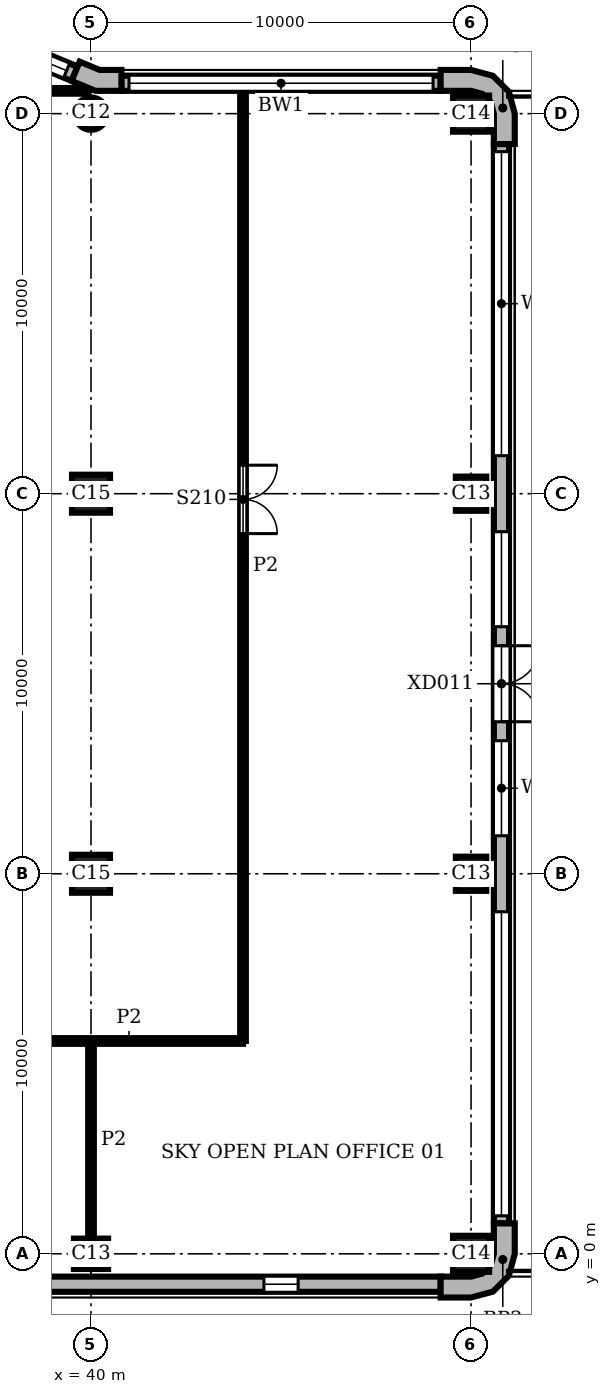
"""IFC4 building model, lengths in metres.
Left out: names, types, materials, properties, quantities, classifications, styles, units other than length and angle.
Written with IfcOpenShell. Run it as: python <this file> out.ifc"""

import sys

from ifc_helpers import new_model, si_unit, direction, frame, frame_2d, origin, origin_2d, place, context, subcontext, project, spatial, polyline, rectangle, circle, outline, extrude, element, fill, save


model = new_model("IFC4")
c1 = context("Model", 3, precision=1e-05, world=origin(), true_north=direction((0.0, 1.0)))
c2 = subcontext(c1, "Body", "Model", "MODEL_VIEW")
j1 = project(units=[si_unit("LENGTHUNIT", "METRE"), si_unit("PLANEANGLEUNIT", "RADIAN")], contexts=[c1])
p1 = place(None, origin())
s1 = spatial("IfcSite", under=j1, at=p1, CompositionType="ELEMENT")
p2 = place(p1, origin())
s2 = spatial("IfcBuilding", under=s1, at=p2, CompositionType="ELEMENT")
p3 = place(p2, frame((0.0, 0.0, 246.0)))
s3 = spatial("IfcBuildingStorey", under=s2, at=p3, CompositionType="ELEMENT", Elevation=246.0)
p4 = place(p3, frame((40.0, 0.0, 0.0), z_axis=(0.0, 0.0, 1.0), x_axis=(1.0, 0.0, 0.0)))
e1 = element("IfcColumn", 1, at=p4, inside=s3, PredefinedType="COLUMN", context=c2, shape_type="SweptSolid", body=[
    extrude(rectangle(XDim=0.9, YDim=0.8, at=origin_2d()), origin(), (0.0, 0.0, 1.0), 5.4),
])
p5 = place(p3, frame((50.0, 0.0, 0.0), z_axis=(0.0, 0.0, 1.0), x_axis=(1.0, 0.0, 0.0)))
e2 = element("IfcColumn", 2, at=p5, inside=s3, PredefinedType="COLUMN", context=c2, shape_type="SweptSolid", body=[
    extrude(rectangle(XDim=0.95, YDim=0.95, at=origin_2d()), origin(), (0.0, 0.0, 1.0), 5.4),
])
for number, where, z_axis, x_axis in (
    (3, (50.0, 10.0, 0.0), (0.0, 0.0, 1.0), (0.0, 1.0, 0.0)),
    (4, (50.0, 20.0, 0.0), (0.0, 0.0, 1.0), (0.0, 1.0, 0.0)),
):
    element("IfcColumn", number, at=place(p3, frame(where, z_axis=z_axis, x_axis=x_axis)), inside=s3, PredefinedType="COLUMN", context=c2, shape_type="SweptSolid", body=[
        extrude(rectangle(XDim=0.9, YDim=0.8, at=origin_2d()), origin(), (0.0, 0.0, 1.0), 5.4),
    ])
p6 = place(p3, frame((50.0, 30.0, 0.0), z_axis=(0.0, 0.0, 1.0), x_axis=(1.0, 0.0, 0.0)))
e5 = element("IfcColumn", 5, at=p6, inside=s3, PredefinedType="COLUMN", context=c2, shape_type="SweptSolid", body=[
    extrude(rectangle(XDim=0.95, YDim=0.95, at=origin_2d()), origin(), (0.0, 0.0, 1.0), 5.4),
])
p7 = place(p3, frame((40.0, 30.0, 0.0), z_axis=(0.0, 0.0, 1.0), x_axis=(1.0, 0.0, 0.0)))
e6 = element("IfcColumn", 6, at=p7, inside=s3, PredefinedType="COLUMN", context=c2, shape_type="SweptSolid", body=[
    extrude(circle(Radius=0.425, at=origin_2d()), origin(), (0.0, 0.0, 1.0), 5.4),
])
for number, where, z_axis, x_axis in (
    (7, (40.0, 10.0, 0.0), (0.0, 0.0, 1.0), (1.0, 0.0, 0.0)),
    (8, (40.0, 20.0, 0.0), (0.0, 0.0, 1.0), (1.0, 0.0, 0.0)),
):
    element("IfcColumn", number, at=place(p3, frame(where, z_axis=z_axis, x_axis=x_axis)), inside=s3, PredefinedType="COLUMN", context=c2, shape_type="SweptSolid", body=[
        extrude(rectangle(XDim=1.0, YDim=1.0, at=origin_2d()), origin(), (0.0, 0.0, 1.0), 5.4),
    ])
p8 = place(p3, origin())
e9 = element("IfcWall", 9, at=p8, inside=s3, PredefinedType="SOLIDWALL", context=c2, shape_type="SweptSolid", body=[
    extrude(outline(polyline([(49.2, -1.0), (49.2, -1.15), (50.0, -1.15), (50.575, -0.996), (50.996, -0.575), (51.15, 0.0), (51.15, 0.8), (51.0, 0.8), (50.6, 0.8), (50.6, 0.0), (50.52, -0.3), (50.3, -0.52), (50.0, -0.6), (49.2, -0.6), (49.2, -1.0)])), origin(), (0.0, 0.0, 1.0), 5.4),
])
e10 = element("IfcWall", 10, at=p8, inside=s3, PredefinedType="SOLIDWALL", context=c2, shape_type="SweptSolid", body=[
    extrude(outline(polyline([(51.0, 29.2), (51.15, 29.2), (51.15, 30.0), (50.996, 30.575), (50.575, 30.996), (50.0, 31.15), (49.2, 31.15), (49.2, 31.0), (49.2, 30.6), (50.0, 30.6), (50.3, 30.52), (50.52, 30.3), (50.6, 30.0), (50.6, 29.2), (51.0, 29.2)])), origin(), (0.0, 0.0, 1.0), 5.4),
])
e11 = element("IfcWall", 11, at=p8, inside=s3, PredefinedType="SOLIDWALL", context=c2, shape_type="SweptSolid", body=[
    extrude(outline(polyline([(40.8, 31.0), (40.8, 31.15), (40.229, 31.15), (39.701, 31.369), (39.644, 31.23), (39.49, 30.861), (40.119, 30.6), (40.8, 30.6), (40.8, 31.0)])), origin(), (0.0, 0.0, 1.0), 5.4),
])
p9 = place(p3, frame((20.8, -0.8, 0.0), z_axis=(0.0, 0.0, 1.0), x_axis=(1.0, 0.0, 0.0)))
e12 = element("IfcWall", 12, at=p9, inside=s3, PredefinedType="SOLIDWALL", context=c2, shape_type="SweptSolid", body=[
    extrude(rectangle(XDim=28.4, YDim=0.4, at=frame_2d((14.2, 0.0))), origin(), (0.0, 0.0, 1.0), 5.4),
])
p10 = place(p9, frame((3.75, 0.0, 0.9)))
e13 = element("IfcOpeningElement", 13, at=p10, cuts=e12, PredefinedType="OPENING", context=c2, shape_type="SweptSolid", body=[
    extrude(rectangle(XDim=0.9, YDim=3.4, at=frame_2d((0.45, 1.7))), frame((0.0, 0.21, 0.0), z_axis=(0.0, -1.0, 0.0), x_axis=(1.0, 0.0, 0.0)), (0.0, 0.0, 1.0), 0.42),
])
p11 = place(p9, frame((13.75, 0.0, 0.9)))
e14 = element("IfcOpeningElement", 14, at=p11, cuts=e12, PredefinedType="OPENING", context=c2, shape_type="SweptSolid", body=[
    extrude(rectangle(XDim=0.9, YDim=3.4, at=frame_2d((0.45, 1.7))), frame((0.0, 0.21, 0.0), z_axis=(0.0, -1.0, 0.0), x_axis=(1.0, 0.0, 0.0)), (0.0, 0.0, 1.0), 0.42),
])
p12 = place(p9, frame((23.75, 0.0, 0.9)))
e15 = element("IfcOpeningElement", 15, at=p12, cuts=e12, PredefinedType="OPENING", context=c2, shape_type="SweptSolid", body=[
    extrude(rectangle(XDim=0.9, YDim=3.4, at=frame_2d((0.45, 1.7))), frame((0.0, 0.21, 0.0), z_axis=(0.0, -1.0, 0.0), x_axis=(1.0, 0.0, 0.0)), (0.0, 0.0, 1.0), 0.42),
])
p13 = place(p3, frame((50.8, 0.8, 0.0), z_axis=(0.0, 0.0, 1.0), x_axis=(0.0, 1.0, 0.0)))
e16 = element("IfcWall", 16, at=p13, inside=s3, PredefinedType="SOLIDWALL", context=c2, shape_type="SweptSolid", body=[
    extrude(rectangle(XDim=28.4, YDim=0.4, at=frame_2d((14.2, 0.0))), origin(), (0.0, 0.0, 1.0), 5.4),
])
p14 = place(p13, frame((0.2, 0.0, 0.9)))
e17 = element("IfcOpeningElement", 17, at=p14, cuts=e16, PredefinedType="OPENING", context=c2, shape_type="SweptSolid", body=[
    extrude(rectangle(XDim=8.0, YDim=3.4, at=frame_2d((4.0, 1.7))), frame((0.0, 0.21, 0.0), z_axis=(0.0, -1.0, 0.0), x_axis=(1.0, 0.0, 0.0)), (0.0, 0.0, 1.0), 0.42),
])
p15 = place(p13, frame((10.2, 0.0, 0.9)))
e18 = element("IfcOpeningElement", 18, at=p15, cuts=e16, PredefinedType="OPENING", context=c2, shape_type="SweptSolid", body=[
    extrude(rectangle(XDim=2.5, YDim=3.4, at=frame_2d((1.25, 1.7))), frame((0.0, 0.21, 0.0), z_axis=(0.0, -1.0, 0.0), x_axis=(1.0, 0.0, 0.0)), (0.0, 0.0, 1.0), 0.42),
])
p16 = place(p13, frame((13.2, 0.0, 0.0)))
e19 = element("IfcOpeningElement", 19, at=p16, cuts=e16, PredefinedType="OPENING", context=c2, shape_type="SweptSolid", body=[
    extrude(rectangle(XDim=2.0, YDim=2.4, at=frame_2d((1.0, 1.2))), frame((0.0, 0.21, 0.0), z_axis=(0.0, -1.0, 0.0), x_axis=(1.0, 0.0, 0.0)), (0.0, 0.0, 1.0), 0.42),
])
p17 = place(p13, frame((15.7, 0.0, 0.9)))
e20 = element("IfcOpeningElement", 20, at=p17, cuts=e16, PredefinedType="OPENING", context=c2, shape_type="SweptSolid", body=[
    extrude(rectangle(XDim=2.5, YDim=3.4, at=frame_2d((1.25, 1.7))), frame((0.0, 0.21, 0.0), z_axis=(0.0, -1.0, 0.0), x_axis=(1.0, 0.0, 0.0)), (0.0, 0.0, 1.0), 0.42),
])
p18 = place(p13, frame((20.2, 0.0, 0.9)))
e21 = element("IfcOpeningElement", 21, at=p18, cuts=e16, PredefinedType="OPENING", context=c2, shape_type="SweptSolid", body=[
    extrude(rectangle(XDim=8.0, YDim=3.4, at=frame_2d((4.0, 1.7))), frame((0.0, 0.21, 0.0), z_axis=(0.0, -1.0, 0.0), x_axis=(1.0, 0.0, 0.0)), (0.0, 0.0, 1.0), 0.42),
])
p19 = place(p3, frame((49.2, 30.8, 0.0), z_axis=(0.0, 0.0, 1.0), x_axis=(-1.0, 0.0, 0.0)))
e22 = element("IfcWall", 22, at=p19, inside=s3, PredefinedType="SOLIDWALL", context=c2, shape_type="SweptSolid", body=[
    extrude(rectangle(XDim=8.4, YDim=0.4, at=frame_2d((4.2, 0.0))), origin(), (0.0, 0.0, 1.0), 5.4),
])
p20 = place(p19, frame((0.2, 0.0, 0.9)))
e23 = element("IfcOpeningElement", 23, at=p20, cuts=e22, PredefinedType="OPENING", context=c2, shape_type="SweptSolid", body=[
    extrude(rectangle(XDim=8.0, YDim=3.4, at=frame_2d((4.0, 1.7))), frame((0.0, 0.21, 0.0), z_axis=(0.0, -1.0, 0.0), x_axis=(1.0, 0.0, 0.0)), (0.0, 0.0, 1.0), 0.42),
])
p21 = place(p3, frame((39.567, 31.045, 0.0), z_axis=(0.0, 0.0, 1.0), x_axis=(-0.923891000409, 0.382655745237, 0.0)))
e24 = element("IfcWall", 24, at=p21, inside=s3, PredefinedType="SOLIDWALL", context=c2, shape_type="SweptSolid", body=[
    extrude(rectangle(XDim=6.053, YDim=0.4, at=frame_2d((3.027, 0.0))), origin(), (0.0, 0.0, 1.0), 5.4),
])
p22 = place(p21, frame((0.227, 0.0, 0.9)))
e25 = element("IfcOpeningElement", 25, at=p22, cuts=e24, PredefinedType="OPENING", context=c2, shape_type="SweptSolid", body=[
    extrude(rectangle(XDim=5.6, YDim=3.4, at=frame_2d((2.8, 1.7))), frame((0.0, 0.21, 0.0), z_axis=(0.0, -1.0, 0.0), x_axis=(1.0, 0.0, 0.0)), (0.0, 0.0, 1.0), 0.42),
])
p23 = place(p3, frame((40.0, 0.4, 0.0), z_axis=(0.0, 0.0, 1.0), x_axis=(0.0, 1.0, 0.0)))
e26 = element("IfcWall", 26, at=p23, inside=s3, PredefinedType="PARTITIONING", context=c2, shape_type="SweptSolid", body=[
    extrude(rectangle(XDim=5.2, YDim=0.15, at=frame_2d((2.6, 0.0))), origin(), (0.0, 0.0, 1.0), 5.08),
])
p24 = place(p3, frame((44.0, 5.6, 0.0), z_axis=(0.0, 0.0, 1.0), x_axis=(0.0, 1.0, 0.0)))
e27 = element("IfcWall", 27, at=p24, inside=s3, PredefinedType="PARTITIONING", context=c2, shape_type="SweptSolid", body=[
    extrude(rectangle(XDim=25.0, YDim=0.15, at=frame_2d((12.5, 0.0))), origin(), (0.0, 0.0, 1.0), 5.08),
])
p25 = place(p24, frame((13.35, 0.0, 0.0)))
e28 = element("IfcOpeningElement", 28, at=p25, cuts=e27, PredefinedType="OPENING", context=c2, shape_type="SweptSolid", body=[
    extrude(rectangle(XDim=1.8, YDim=2.1, at=frame_2d((0.9, 1.05))), frame((0.0, 0.085, 0.0), z_axis=(0.0, -1.0, 0.0), x_axis=(1.0, 0.0, 0.0)), (0.0, 0.0, 1.0), 0.17),
])
p26 = place(p3, frame((38.0, 5.6, 0.0), z_axis=(0.0, 0.0, 1.0), x_axis=(1.0, 0.0, 0.0)))
e29 = element("IfcWall", 29, at=p26, inside=s3, PredefinedType="PARTITIONING", context=c2, shape_type="SweptSolid", body=[
    extrude(rectangle(XDim=6.0, YDim=0.15, at=frame_2d((3.0, 0.0))), origin(), (0.0, 0.0, 1.0), 5.08),
])
p27 = place(p3, frame((33.2, 30.6, 0.0), z_axis=(0.0, 0.0, 1.0), x_axis=(1.0, 0.0, 0.0)))
e30 = element("IfcWall", 30, at=p27, inside=s3, PredefinedType="PARTITIONING", context=c2, shape_type="SweptSolid", body=[
    extrude(rectangle(XDim=6.738, YDim=0.15, at=frame_2d((3.369, 0.0))), origin(), (0.0, 0.0, 1.0), 5.08),
])
p28 = place(p12, origin())
e31 = element("IfcWindow", 31, at=p28, inside=s3, PartitioningType="SINGLE_PANEL", PredefinedType="WINDOW", context=c2, shape_type="SweptSolid", body=[
    extrude(rectangle(XDim=0.9, YDim=3.4, at=frame_2d((0.45, 1.7))), frame((0.0, 0.16, 0.0), z_axis=(0.0, -1.0, 0.0), x_axis=(1.0, 0.0, 0.0)), (0.0, 0.0, 1.0), 0.06),
])
fill(e15, e31)
p29 = place(p14, origin())
e32 = element("IfcWindow", 32, at=p29, inside=s3, PartitioningType="SINGLE_PANEL", PredefinedType="WINDOW", context=c2, shape_type="SweptSolid", body=[
    extrude(rectangle(XDim=8.0, YDim=3.4, at=frame_2d((4.0, 1.7))), frame((0.0, 0.16, 0.0), z_axis=(0.0, -1.0, 0.0), x_axis=(1.0, 0.0, 0.0)), (0.0, 0.0, 1.0), 0.06),
])
fill(e17, e32)
p30 = place(p15, origin())
e33 = element("IfcWindow", 33, at=p30, inside=s3, PartitioningType="SINGLE_PANEL", PredefinedType="WINDOW", context=c2, shape_type="SweptSolid", body=[
    extrude(rectangle(XDim=2.5, YDim=3.4, at=frame_2d((1.25, 1.7))), frame((0.0, 0.16, 0.0), z_axis=(0.0, -1.0, 0.0), x_axis=(1.0, 0.0, 0.0)), (0.0, 0.0, 1.0), 0.06),
])
fill(e18, e33)
p31 = place(p16, frame((2.0, 0.0, 0.0), z_axis=(0.0, 0.0, 1.0), x_axis=(-1.0, 0.0, 0.0)))
e34 = element("IfcDoor", 34, at=p31, inside=s3, OperationType="DOUBLE_DOOR_DOUBLE_SWING", PredefinedType="DOOR", context=c2, shape_type="SweptSolid", body=[
    extrude(rectangle(XDim=2.0, YDim=2.4, at=frame_2d((1.0, 1.2))), frame((0.0, 0.025, 0.0), z_axis=(0.0, -1.0, 0.0), x_axis=(1.0, 0.0, 0.0)), (0.0, 0.0, 1.0), 0.05),
])
fill(e19, e34)
p32 = place(p17, origin())
e35 = element("IfcWindow", 35, at=p32, inside=s3, PartitioningType="SINGLE_PANEL", PredefinedType="WINDOW", context=c2, shape_type="SweptSolid", body=[
    extrude(rectangle(XDim=2.5, YDim=3.4, at=frame_2d((1.25, 1.7))), frame((0.0, 0.16, 0.0), z_axis=(0.0, -1.0, 0.0), x_axis=(1.0, 0.0, 0.0)), (0.0, 0.0, 1.0), 0.06),
])
fill(e20, e35)
p33 = place(p18, origin())
e36 = element("IfcWindow", 36, at=p33, inside=s3, PartitioningType="SINGLE_PANEL", PredefinedType="WINDOW", context=c2, shape_type="SweptSolid", body=[
    extrude(rectangle(XDim=8.0, YDim=3.4, at=frame_2d((4.0, 1.7))), frame((0.0, 0.16, 0.0), z_axis=(0.0, -1.0, 0.0), x_axis=(1.0, 0.0, 0.0)), (0.0, 0.0, 1.0), 0.06),
])
fill(e21, e36)
p34 = place(p20, origin())
e37 = element("IfcWindow", 37, at=p34, inside=s3, PartitioningType="SINGLE_PANEL", PredefinedType="WINDOW", context=c2, shape_type="SweptSolid", body=[
    extrude(rectangle(XDim=8.0, YDim=3.4, at=frame_2d((4.0, 1.7))), frame((0.0, 0.16, 0.0), z_axis=(0.0, -1.0, 0.0), x_axis=(1.0, 0.0, 0.0)), (0.0, 0.0, 1.0), 0.06),
])
fill(e23, e37)
p35 = place(p22, origin())
e38 = element("IfcWindow", 38, at=p35, inside=s3, PartitioningType="SINGLE_PANEL", PredefinedType="WINDOW", context=c2, shape_type="SweptSolid", body=[
    extrude(rectangle(XDim=5.6, YDim=3.4, at=frame_2d((2.8, 1.7))), frame((0.0, 0.16, 0.0), z_axis=(0.0, -1.0, 0.0), x_axis=(1.0, 0.0, 0.0)), (0.0, 0.0, 1.0), 0.06),
])
fill(e25, e38)
p36 = place(p25, frame((1.8, 0.0, 0.0), z_axis=(0.0, 0.0, 1.0), x_axis=(-1.0, 0.0, 0.0)))
e39 = element("IfcDoor", 39, at=p36, inside=s3, OperationType="DOUBLE_DOOR_SINGLE_SWING", PredefinedType="DOOR", context=c2, shape_type="SweptSolid", body=[
    extrude(rectangle(XDim=1.8, YDim=2.1, at=frame_2d((0.9, 1.05))), frame((0.0, 0.025, 0.0), z_axis=(0.0, -1.0, 0.0), x_axis=(1.0, 0.0, 0.0)), (0.0, 0.0, 1.0), 0.05),
])
fill(e28, e39)
save(model, sys.argv[1])
